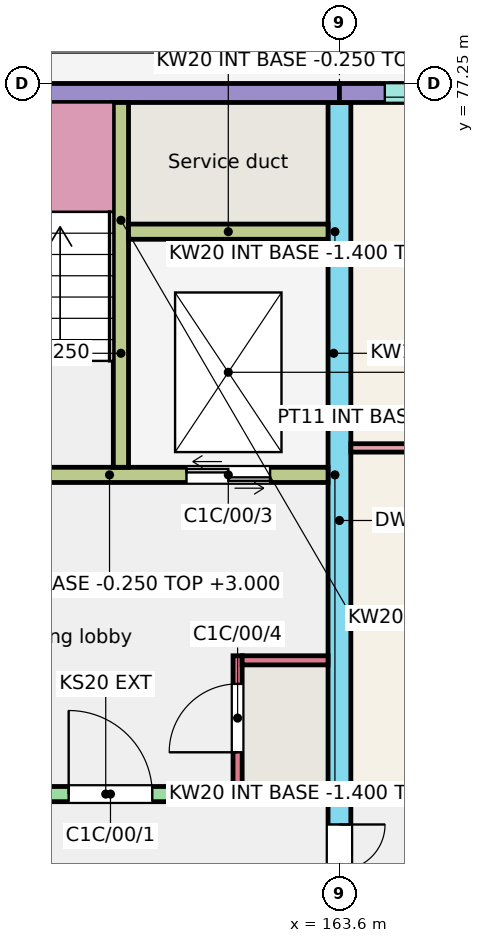
"""IFC4 building model, lengths in metres.
Left out: names, types, materials, properties, quantities, classifications, styles, units other than length and angle.
Written with IfcOpenShell. Run it as: python <this file> out.ifc"""

import sys

from ifc_helpers import new_model, si_unit, direction, frame, frame_2d, origin, place, context, subcontext, project, spatial, rectangle, extrude, element, fill, save


model = new_model("IFC4")
c1 = context("Model", 3, precision=1e-05, world=origin(), true_north=direction((0.0, 1.0)))
c2 = subcontext(c1, "Body", "Model", "MODEL_VIEW")
j1 = project(units=[si_unit("LENGTHUNIT", "METRE"), si_unit("PLANEANGLEUNIT", "RADIAN")], contexts=[c1])
p1 = place(None, origin())
s1 = spatial("IfcSite", under=j1, at=p1, CompositionType="ELEMENT")
p2 = place(p1, origin())
s2 = spatial("IfcBuilding", under=s1, at=p2, CompositionType="ELEMENT")
p3 = place(p2, origin())
s3 = spatial("IfcBuildingStorey", under=s2, at=p3, CompositionType="ELEMENT", Elevation=0.0)
p4 = place(p3, frame((163.6, 66.0, -0.25), z_axis=(0.0, 0.0, 1.0), x_axis=(0.0, 1.0, 0.0)))
e1 = element("IfcWall", 1, at=p4, inside=s3, PredefinedType="SHEAR", context=c2, shape_type="SweptSolid", body=[
    extrude(rectangle(XDim=11.0, YDim=0.3, at=frame_2d((5.5, 0.0))), origin(), (0.0, 0.0, 1.0), 3.25),
])
p5 = place(p4, frame((0.3, 0.0, 0.25)))
e2 = element("IfcOpeningElement", 2, at=p5, cuts=e1, PredefinedType="OPENING", context=c2, shape_type="SweptSolid", body=[
    extrude(rectangle(XDim=1.2, YDim=2.1, at=frame_2d((0.6, 1.05))), frame((0.0, 0.16, 0.0), z_axis=(0.0, -1.0, 0.0), x_axis=(1.0, 0.0, 0.0)), (0.0, 0.0, 1.0), 0.32),
])
p6 = place(p3, frame((157.6, 77.125, -0.25), z_axis=(0.0, 0.0, 1.0), x_axis=(1.0, 0.0, 0.0)))
e3 = element("IfcWall", 3, at=p6, inside=s3, PredefinedType="SOLIDWALL", context=c2, shape_type="SweptSolid", body=[
    extrude(rectangle(XDim=6.0, YDim=0.25, at=frame_2d((3.0, 0.0))), origin(), (0.0, 0.0, 1.0), 3.25),
])
p7 = place(p6, frame((1.025, 0.0, 0.25)))
e4 = element("IfcOpeningElement", 4, at=p7, cuts=e3, PredefinedType="OPENING", context=c2, shape_type="SweptSolid", body=[
    extrude(rectangle(XDim=1.1, YDim=2.1, at=frame_2d((0.55, 1.05))), frame((0.0, 0.135, 0.0), z_axis=(0.0, -1.0, 0.0), x_axis=(1.0, 0.0, 0.0)), (0.0, 0.0, 1.0), 0.27),
])
p8 = place(p3, frame((157.6, 67.9, -0.25), z_axis=(0.0, 0.0, 1.0), x_axis=(1.0, 0.0, 0.0)))
e5 = element("IfcWall", 5, at=p8, inside=s3, PredefinedType="SHEAR", context=c2, shape_type="SweptSolid", body=[
    extrude(rectangle(XDim=5.85, YDim=0.2, at=frame_2d((2.925, 0.0))), origin(), (0.0, 0.0, 1.0), 3.25),
])
p9 = place(p8, frame((2.438, 0.0, 0.25)))
e6 = element("IfcOpeningElement", 6, at=p9, cuts=e5, PredefinedType="OPENING", context=c2, shape_type="SweptSolid", body=[
    extrude(rectangle(XDim=1.1, YDim=2.1, at=frame_2d((0.55, 1.05))), frame((0.0, 0.11, 0.0), z_axis=(0.0, -1.0, 0.0), x_axis=(1.0, 0.0, 0.0)), (0.0, 0.0, 1.0), 0.22),
])
p10 = place(p3, frame((157.725, 72.1, -0.25), z_axis=(0.0, 0.0, 1.0), x_axis=(1.0, 0.0, 0.0)))
e7 = element("IfcWall", 7, at=p10, inside=s3, PredefinedType="SHEAR", context=c2, shape_type="SweptSolid", body=[
    extrude(rectangle(XDim=5.725, YDim=0.2, at=frame_2d((2.862, 0.0))), origin(), (0.0, 0.0, 1.0), 3.25),
])
p11 = place(p10, frame((0.95, 0.0, 0.25)))
e8 = element("IfcOpeningElement", 8, at=p11, cuts=e7, PredefinedType="OPENING", context=c2, shape_type="SweptSolid", body=[
    extrude(rectangle(XDim=1.0, YDim=2.1, at=frame_2d((0.5, 1.05))), frame((0.0, 0.11, 0.0), z_axis=(0.0, -1.0, 0.0), x_axis=(1.0, 0.0, 0.0)), (0.0, 0.0, 1.0), 0.22),
])
p12 = place(p10, frame((3.863, 0.0, 0.25)))
e9 = element("IfcOpeningElement", 9, at=p12, cuts=e7, PredefinedType="OPENING", context=c2, shape_type="SweptSolid", body=[
    extrude(rectangle(XDim=1.1, YDim=2.1, at=frame_2d((0.55, 1.05))), frame((0.0, 0.11, 0.0), z_axis=(0.0, -1.0, 0.0), x_axis=(1.0, 0.0, 0.0)), (0.0, 0.0, 1.0), 0.22),
])
p13 = place(p3, frame((160.725, 72.2, -0.25), z_axis=(0.0, 0.0, 1.0), x_axis=(0.0, 1.0, 0.0)))
e10 = element("IfcWall", 10, at=p13, inside=s3, PredefinedType="SHEAR", context=c2, shape_type="SweptSolid", body=[
    extrude(rectangle(XDim=4.8, YDim=0.2, at=frame_2d((2.4, 0.0))), origin(), (0.0, 0.0, 1.0), 3.25),
])
p14 = place(p3, frame((160.825, 75.3, -0.25), z_axis=(0.0, 0.0, 1.0), x_axis=(1.0, 0.0, 0.0)))
e11 = element("IfcWall", 11, at=p14, inside=s3, PredefinedType="SHEAR", context=c2, shape_type="SweptSolid", body=[
    extrude(rectangle(XDim=2.625, YDim=0.2, at=frame_2d((1.312, 0.0))), origin(), (0.0, 0.0, 1.0), 3.25),
])
p15 = place(p3, frame((162.26, 68.0, -0.25), z_axis=(0.0, 0.0, 1.0), x_axis=(0.0, 1.0, 0.0)))
e12 = element("IfcWall", 12, at=p15, inside=s3, PredefinedType="SHEAR", context=c2, shape_type="SweptSolid", body=[
    extrude(rectangle(XDim=1.72, YDim=0.12, at=frame_2d((0.86, 0.0))), origin(), (0.0, 0.0, 1.0), 3.25),
])
p16 = place(p15, frame((0.45, 0.0, 0.25)))
e13 = element("IfcOpeningElement", 13, at=p16, cuts=e12, PredefinedType="OPENING", context=c2, shape_type="SweptSolid", body=[
    extrude(rectangle(XDim=0.9, YDim=2.1, at=frame_2d((0.45, 1.05))), frame((0.0, 0.07, 0.0), z_axis=(0.0, -1.0, 0.0), x_axis=(1.0, 0.0, 0.0)), (0.0, 0.0, 1.0), 0.14),
])
p17 = place(p3, frame((162.32, 69.66, -0.25), z_axis=(0.0, 0.0, 1.0), x_axis=(1.0, 0.0, 0.0)))
e14 = element("IfcWall", 14, at=p17, inside=s3, PredefinedType="SHEAR", context=c2, shape_type="SweptSolid", body=[
    extrude(rectangle(XDim=1.13, YDim=0.12, at=frame_2d((0.565, 0.0))), origin(), (0.0, 0.0, 1.0), 3.25),
])
p18 = place(p3, frame((163.6, 77.125, -0.25), z_axis=(0.0, 0.0, 1.0), x_axis=(1.0, 0.0, 0.0)))
e15 = element("IfcWall", 15, at=p18, inside=s3, PredefinedType="SOLIDWALL", context=c2, shape_type="SweptSolid", body=[
    extrude(rectangle(XDim=3.6, YDim=0.25, at=frame_2d((1.8, 0.0))), origin(), (0.0, 0.0, 1.0), 3.25),
])
p19 = place(p18, frame((0.597, 0.0, 1.35)))
e16 = element("IfcOpeningElement", 16, at=p19, cuts=e15, PredefinedType="OPENING", context=c2, shape_type="SweptSolid", body=[
    extrude(rectangle(XDim=1.2, YDim=1.3, at=frame_2d((0.6, 0.65))), frame((0.0, 0.135, 0.0), z_axis=(0.0, -1.0, 0.0), x_axis=(1.0, 0.0, 0.0)), (0.0, 0.0, 1.0), 0.27),
])
p20 = place(p18, frame((2.344, 0.0, 0.25)))
e17 = element("IfcOpeningElement", 17, at=p20, cuts=e15, PredefinedType="OPENING", context=c2, shape_type="SweptSolid", body=[
    extrude(rectangle(XDim=1.0, YDim=2.1, at=frame_2d((0.5, 1.05))), frame((0.0, 0.135, 0.0), z_axis=(0.0, -1.0, 0.0), x_axis=(1.0, 0.0, 0.0)), (0.0, 0.0, 1.0), 0.27),
])
p21 = place(p3, frame((163.75, 67.9, -0.25), z_axis=(0.0, 0.0, 1.0), x_axis=(1.0, 0.0, 0.0)))
e18 = element("IfcWall", 18, at=p21, inside=s3, PredefinedType="SOLIDWALL", context=c2, shape_type="SweptSolid", body=[
    extrude(rectangle(XDim=3.45, YDim=0.2, at=frame_2d((1.725, 0.0))), origin(), (0.0, 0.0, 1.0), 3.25),
])
p22 = place(p21, frame((0.925, 0.0, 1.15)))
e19 = element("IfcOpeningElement", 19, at=p22, cuts=e18, PredefinedType="OPENING", context=c2, shape_type="SweptSolid", body=[
    extrude(rectangle(XDim=1.5, YDim=1.5, at=frame_2d((0.75, 0.75))), frame((0.0, 0.11, 0.0), z_axis=(0.0, -1.0, 0.0), x_axis=(1.0, 0.0, 0.0)), (0.0, 0.0, 1.0), 0.22),
])
for number, where, z_axis, x_axis in (
    (20, (160.625, 72.1, -1.4), (0.0, 0.0, 1.0), (1.0, 0.0, 0.0)),
    (21, (160.625, 75.3, -1.4), (0.0, 0.0, 1.0), (1.0, 0.0, 0.0)),
):
    element("IfcWall", number, at=place(p3, frame(where, z_axis=z_axis, x_axis=x_axis)), inside=s3, PredefinedType="SHEAR", context=c2, shape_type="SweptSolid", body=[
        extrude(rectangle(XDim=2.975, YDim=0.2, at=frame_2d((1.488, 0.0))), origin(), (0.0, 0.0, 1.0), 1.15),
    ])
p23 = place(p3, frame((160.725, 72.2, -1.4), z_axis=(0.0, 0.0, 1.0), x_axis=(0.0, 1.0, 0.0)))
e22 = element("IfcWall", 22, at=p23, inside=s3, PredefinedType="SHEAR", context=c2, shape_type="SweptSolid", body=[
    extrude(rectangle(XDim=3.0, YDim=0.2, at=frame_2d((1.5, 0.0))), origin(), (0.0, 0.0, 1.0), 1.15),
])
p24 = place(p3, frame((163.525, 72.2, -1.4), z_axis=(0.0, 0.0, 1.0), x_axis=(0.0, 1.0, 0.0)))
e23 = element("IfcWall", 23, at=p24, inside=s3, PredefinedType="SHEAR", context=c2, shape_type="SweptSolid", body=[
    extrude(rectangle(XDim=3.0, YDim=0.15, at=frame_2d((1.5, 0.0))), origin(), (0.0, 0.0, 1.0), 1.15),
])
p25 = place(p3, frame((163.75, 72.455, 0.0), z_axis=(0.0, 0.0, 1.0), x_axis=(1.0, 0.0, 0.0)))
e24 = element("IfcWall", 24, at=p25, inside=s3, PredefinedType="PARTITIONING", context=c2, shape_type="SweptSolid", body=[
    extrude(rectangle(XDim=3.35, YDim=0.11, at=frame_2d((1.675, 0.0))), origin(), (0.0, 0.0, 1.0), 2.8),
])
p26 = place(p19, origin())
e25 = element("IfcWindow", 25, at=p26, inside=s3, PartitioningType="SINGLE_PANEL", PredefinedType="WINDOW", context=c2, shape_type="SweptSolid", body=[
    extrude(rectangle(XDim=1.2, YDim=1.3, at=frame_2d((0.6, 0.65))), frame((0.0, -0.025, 0.0), z_axis=(0.0, -1.0, 0.0), x_axis=(1.0, 0.0, 0.0)), (0.0, 0.0, 1.0), 0.06),
])
fill(e16, e25)
p27 = place(p9, origin())
e26 = element("IfcDoor", 26, at=p27, inside=s3, OperationType="SINGLE_SWING_LEFT", PredefinedType="DOOR", context=c2, shape_type="SweptSolid", body=[
    extrude(rectangle(XDim=1.1, YDim=2.1, at=frame_2d((0.55, 1.05))), frame((0.0, 0.025, 0.0), z_axis=(0.0, -1.0, 0.0), x_axis=(1.0, 0.0, 0.0)), (0.0, 0.0, 1.0), 0.05),
])
fill(e6, e26)
p28 = place(p12, origin())
e27 = element("IfcDoor", 27, at=p28, inside=s3, OperationType="DOUBLE_DOOR_SLIDING", PredefinedType="DOOR", context=c2, shape_type="SweptSolid", body=[
    extrude(rectangle(XDim=1.1, YDim=2.1, at=frame_2d((0.55, 1.05))), frame((0.0, 0.025, 0.0), z_axis=(0.0, -1.0, 0.0), x_axis=(1.0, 0.0, 0.0)), (0.0, 0.0, 1.0), 0.05),
])
fill(e9, e27)
p29 = place(p16, origin())
e28 = element("IfcDoor", 28, at=p29, inside=s3, OperationType="SINGLE_SWING_LEFT", PredefinedType="DOOR", context=c2, shape_type="SweptSolid", body=[
    extrude(rectangle(XDim=0.9, YDim=2.1, at=frame_2d((0.45, 1.05))), frame((0.0, 0.025, 0.0), z_axis=(0.0, -1.0, 0.0), x_axis=(1.0, 0.0, 0.0)), (0.0, 0.0, 1.0), 0.05),
])
fill(e13, e28)
p30 = place(p5, origin())
e29 = element("IfcDoor", 29, at=p30, inside=s3, OperationType="DOUBLE_DOOR_SINGLE_SWING", PredefinedType="DOOR", context=c2, shape_type="SweptSolid", body=[
    extrude(rectangle(XDim=1.2, YDim=2.1, at=frame_2d((0.6, 1.05))), frame((0.0, 0.025, 0.0), z_axis=(0.0, -1.0, 0.0), x_axis=(1.0, 0.0, 0.0)), (0.0, 0.0, 1.0), 0.05),
])
fill(e2, e29)
save(model, sys.argv[1])
